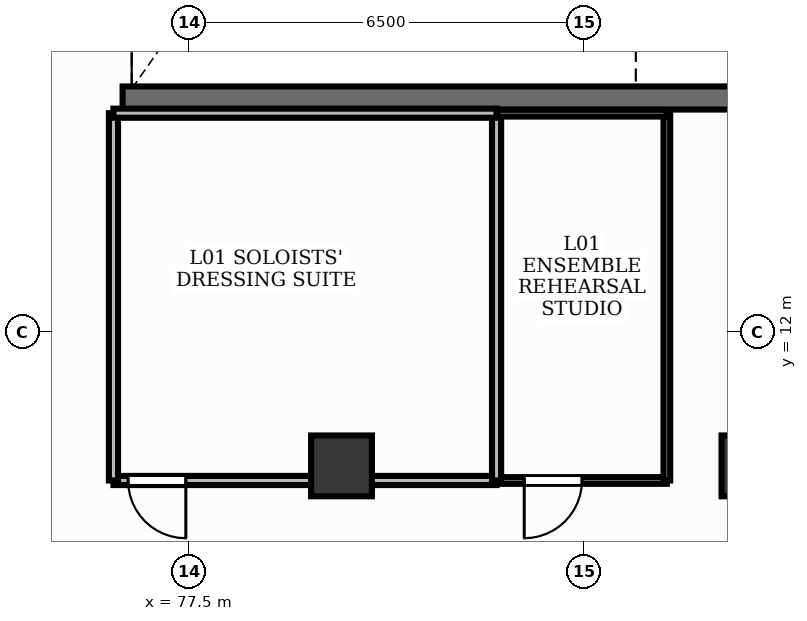
"""IFC4 building model, lengths in metres.
Left out: names, types, materials, properties, quantities, classifications, styles, units other than length and angle.
Written with IfcOpenShell. Run it as: python <this file> out.ifc"""

import sys

from ifc_helpers import new_model, si_unit, direction, frame, frame_2d, origin, origin_2d, place, context, subcontext, project, spatial, rectangle, extrude, element, fill, save


model = new_model("IFC4")
c1 = context("Model", 3, precision=1e-05, world=origin(), true_north=direction((0.0, 1.0)))
c2 = subcontext(c1, "Body", "Model", "MODEL_VIEW")
j1 = project(units=[si_unit("LENGTHUNIT", "METRE"), si_unit("PLANEANGLEUNIT", "RADIAN")], contexts=[c1])
p1 = place(None, origin())
s1 = spatial("IfcSite", under=j1, at=p1, CompositionType="ELEMENT")
p2 = place(p1, origin())
s2 = spatial("IfcBuilding", under=s1, at=p2, CompositionType="ELEMENT")
p3 = place(p2, frame((0.0, 0.0, 5.4)))
s3 = spatial("IfcBuildingStorey", under=s2, at=p3, CompositionType="ELEMENT", Elevation=5.4)
for number, where, z_axis, x_axis in (
    (1, (80.0, 9.8, 0.0), (0.0, 0.0, 1.0), (1.0, 0.0, 0.0)),
    (2, (86.75, 9.8, 0.0), (0.0, 0.0, 1.0), (1.0, 0.0, 0.0)),
):
    element("IfcColumn", number, at=place(p3, frame(where, z_axis=z_axis, x_axis=x_axis)), inside=s3, PredefinedType="COLUMN", context=c2, shape_type="SweptSolid", body=[
        extrude(rectangle(XDim=1.0, YDim=1.0, at=origin_2d()), origin(), (0.0, 0.0, 1.0), 4.5),
    ])
p4 = place(p3, frame((76.4, 15.85, 0.0), z_axis=(0.0, 0.0, 1.0), x_axis=(1.0, 0.0, 0.0)))
e3 = element("IfcWall", 3, at=p4, inside=s3, PredefinedType="SHEAR", context=c2, shape_type="SweptSolid", body=[
    extrude(rectangle(XDim=15.75, YDim=0.38, at=frame_2d((7.875, 0.0))), origin(), (0.0, 0.0, 1.0), 4.5),
])
p5 = place(p3, frame((82.55, 9.56, 0.0), z_axis=(0.0, 0.0, 1.0), x_axis=(-1.0, 0.0, 0.0)))
e4 = element("IfcWall", 4, at=p5, inside=s3, PredefinedType="PARTITIONING", context=c2, shape_type="SweptSolid", body=[
    extrude(rectangle(XDim=6.3, YDim=0.15, at=frame_2d((3.15, 0.0))), origin(), (0.0, 0.0, 1.0), 3.51),
])
p6 = place(p5, frame((5.11, 0.0, 0.0)))
e5 = element("IfcOpeningElement", 5, at=p6, cuts=e4, PredefinedType="OPENING", context=c2, shape_type="SweptSolid", body=[
    extrude(rectangle(XDim=0.95, YDim=2.15, at=frame_2d((0.475, 1.075))), frame((0.0, 0.09, 0.0), z_axis=(0.0, -1.0, 0.0), x_axis=(1.0, 0.0, 0.0)), (0.0, 0.0, 1.0), 0.18),
])
p7 = place(p3, frame((85.35, 9.56, 0.0), z_axis=(0.0, 0.0, 1.0), x_axis=(-1.0, 0.0, 0.0)))
e6 = element("IfcWall", 6, at=p7, inside=s3, PredefinedType="MOVABLE", context=c2, shape_type="SweptSolid", body=[
    extrude(rectangle(XDim=2.79, YDim=0.11, at=frame_2d((1.395, 0.0))), origin(), (0.0, 0.0, 1.0), 3.51),
])
p8 = place(p7, frame((1.395, 0.0, 0.0)))
e7 = element("IfcOpeningElement", 7, at=p8, cuts=e6, PredefinedType="OPENING", context=c2, shape_type="SweptSolid", body=[
    extrude(rectangle(XDim=0.95, YDim=2.15, at=frame_2d((0.475, 1.075))), frame((0.0, 0.07, 0.0), z_axis=(0.0, -1.0, 0.0), x_axis=(1.0, 0.0, 0.0)), (0.0, 0.0, 1.0), 0.14),
])
for number, where, z_axis, x_axis in (
    (8, (82.55, 15.6, 0.0), (0.0, 0.0, 1.0), (0.0, -1.0, 0.0)),
    (9, (76.25, 9.56, 0.0), (0.0, 0.0, 1.0), (0.0, 1.0, 0.0)),
):
    element("IfcWall", number, at=place(p3, frame(where, z_axis=z_axis, x_axis=x_axis)), inside=s3, PredefinedType="PARTITIONING", context=c2, shape_type="SweptSolid", body=[
        extrude(rectangle(XDim=6.04, YDim=0.15, at=frame_2d((3.02, 0.0))), origin(), (0.0, 0.0, 1.0), 3.51),
    ])
p9 = place(p3, frame((76.25, 15.6, 0.0), z_axis=(0.0, 0.0, 1.0), x_axis=(1.0, 0.0, 0.0)))
e10 = element("IfcWall", 10, at=p9, inside=s3, PredefinedType="PARTITIONING", context=c2, shape_type="SweptSolid", body=[
    extrude(rectangle(XDim=6.3, YDim=0.15, at=frame_2d((3.15, 0.0))), origin(), (0.0, 0.0, 1.0), 3.51),
])
p10 = place(p3, frame((85.35, 15.6, 0.0), z_axis=(0.0, 0.0, 1.0), x_axis=(0.0, -1.0, 0.0)))
e11 = element("IfcWall", 11, at=p10, inside=s3, PredefinedType="MOVABLE", context=c2, shape_type="SweptSolid", body=[
    extrude(rectangle(XDim=6.04, YDim=0.11, at=frame_2d((3.02, 0.0))), origin(), (0.0, 0.0, 1.0), 3.51),
])
p11 = place(p3, frame((82.56, 15.6, 0.0), z_axis=(0.0, 0.0, 1.0), x_axis=(1.0, 0.0, 0.0)))
e12 = element("IfcWall", 12, at=p11, inside=s3, PredefinedType="MOVABLE", context=c2, shape_type="SweptSolid", body=[
    extrude(rectangle(XDim=2.79, YDim=0.11, at=frame_2d((1.395, 0.0))), origin(), (0.0, 0.0, 1.0), 3.51),
])
p12 = place(p6, origin())
e13 = element("IfcDoor", 13, at=p12, inside=s3, OperationType="SINGLE_SWING_LEFT", PredefinedType="DOOR", context=c2, shape_type="SweptSolid", body=[
    extrude(rectangle(XDim=0.95, YDim=2.15, at=frame_2d((0.475, 1.075))), frame((0.0, 0.025, 0.0), z_axis=(0.0, -1.0, 0.0), x_axis=(1.0, 0.0, 0.0)), (0.0, 0.0, 1.0), 0.05),
])
fill(e5, e13)
p13 = place(p8, origin())
e14 = element("IfcDoor", 14, at=p13, inside=s3, OperationType="SINGLE_SWING_RIGHT", PredefinedType="DOOR", context=c2, shape_type="SweptSolid", body=[
    extrude(rectangle(XDim=0.95, YDim=2.15, at=frame_2d((0.475, 1.075))), frame((0.0, 0.025, 0.0), z_axis=(0.0, -1.0, 0.0), x_axis=(1.0, 0.0, 0.0)), (0.0, 0.0, 1.0), 0.05),
])
fill(e7, e14)
save(model, sys.argv[1])
